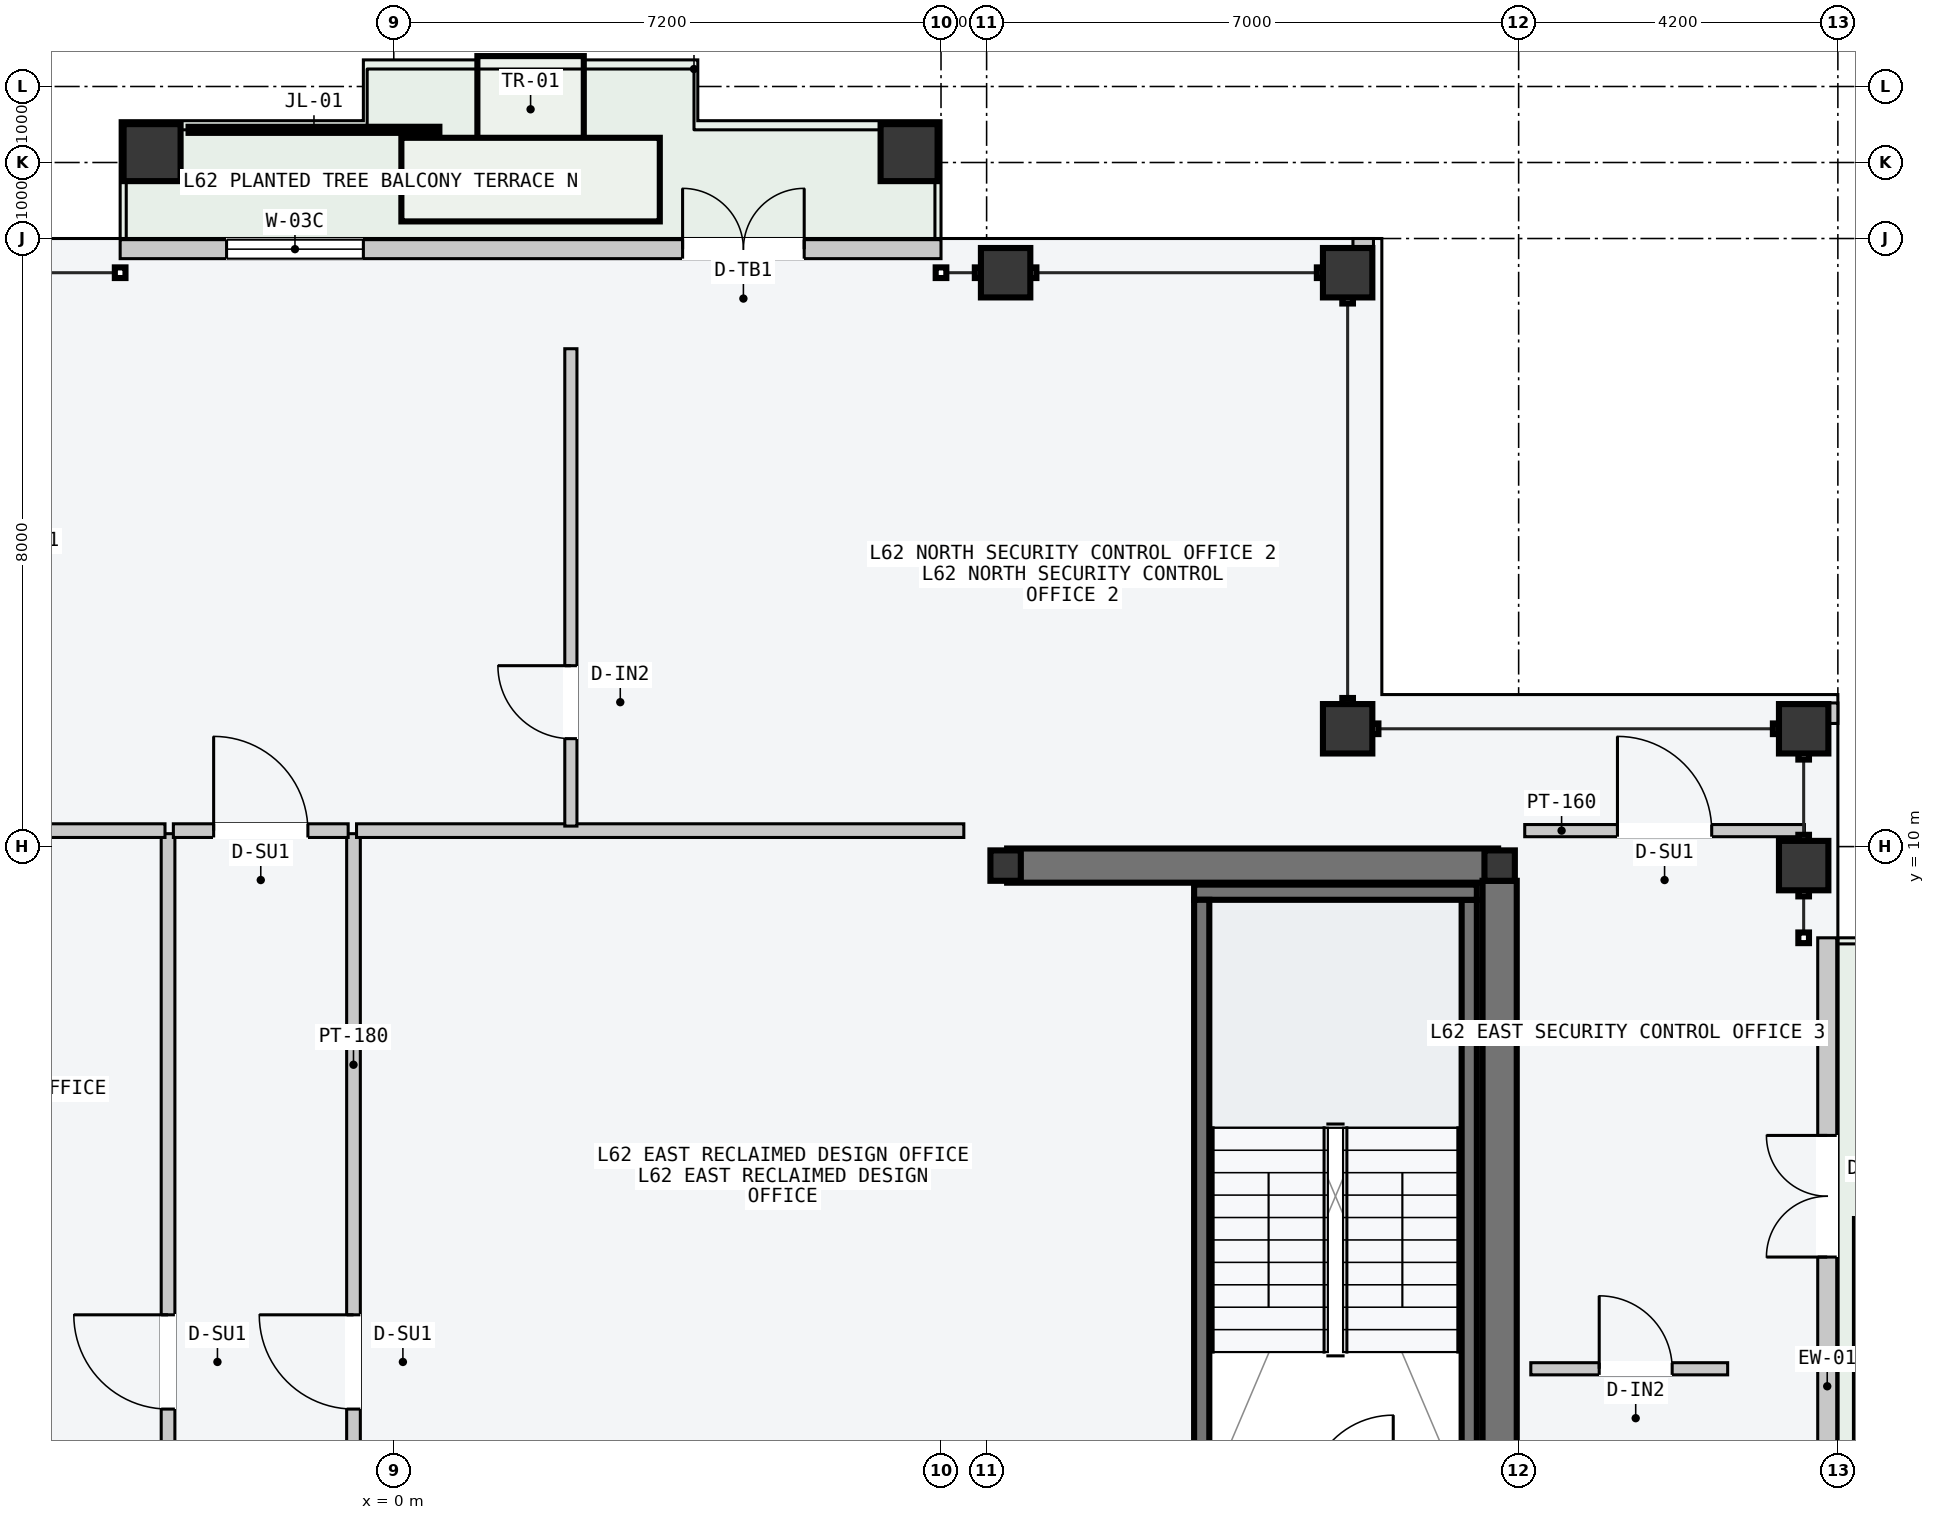
"""IFC4 building model, lengths in metres.
Left out: names, types, materials, properties, quantities, classifications, styles, units other than length and angle.
Written with IfcOpenShell. Run it as: python <this file> out.ifc"""

import sys

from ifc_helpers import new_model, si_unit, direction, frame, frame_2d, origin, origin_2d, place, context, subcontext, project, spatial, rectangle, hollow_rectangle, i_section, extrude, element, fill, save


model = new_model("IFC4")
c1 = context("Model", 3, precision=1e-05, world=origin(), true_north=direction((0.0, 1.0)))
c2 = subcontext(c1, "Body", "Model", "MODEL_VIEW")
j1 = project(units=[si_unit("LENGTHUNIT", "METRE"), si_unit("PLANEANGLEUNIT", "RADIAN")], contexts=[c1])
p1 = place(None, origin())
s1 = spatial("IfcSite", under=j1, at=p1, CompositionType="ELEMENT")
p2 = place(p1, origin())
s2 = spatial("IfcBuilding", under=s1, at=p2, CompositionType="ELEMENT")
p3 = place(p2, frame((0.0, 0.0, 236.4)))
s3 = spatial("IfcBuildingStorey", under=s2, at=p3, CompositionType="ELEMENT", Elevation=236.4)
p4 = place(p3, frame((8.07, 9.75, -0.2), z_axis=(0.0, 0.0, 1.0), x_axis=(1.0, 0.0, 0.0)))
e1 = element("IfcWall", 1, at=p4, inside=s3, PredefinedType="SHEAR", context=c2, shape_type="SweptSolid", body=[
    extrude(rectangle(XDim=6.46, YDim=0.45, at=frame_2d((3.23, 0.0))), origin(), (0.0, 0.0, 1.0), 3.6),
])
p5 = place(p3, frame((14.55, 0.2, -0.2), z_axis=(0.0, 0.0, 1.0), x_axis=(0.0, 1.0, 0.0)))
e2 = element("IfcWall", 2, at=p5, inside=s3, PredefinedType="SHEAR", context=c2, shape_type="SweptSolid", body=[
    extrude(rectangle(XDim=9.35, YDim=0.45, at=frame_2d((4.675, 0.0))), origin(), (0.0, 0.0, 1.0), 3.6),
])
p6 = place(p3, frame((14.15, 1.5, -0.2), z_axis=(0.0, 0.0, 1.0), x_axis=(0.0, 1.0, 0.0)))
e3 = element("IfcWall", 3, at=p6, inside=s3, PredefinedType="SOLIDWALL", context=c2, shape_type="SweptSolid", body=[
    extrude(rectangle(XDim=7.8, YDim=0.2, at=frame_2d((3.9, 0.0))), origin(), (0.0, 0.0, 1.0), 3.6),
])
p7 = place(p3, frame((10.53, 9.4, -0.2), z_axis=(0.0, 0.0, 1.0), x_axis=(1.0, 0.0, 0.0)))
e4 = element("IfcWall", 4, at=p7, inside=s3, PredefinedType="SOLIDWALL", context=c2, shape_type="SweptSolid", body=[
    extrude(rectangle(XDim=3.72, YDim=0.2, at=frame_2d((1.86, 0.0))), origin(), (0.0, 0.0, 1.0), 3.6),
])
p8 = place(p3, frame((10.63, 1.5, -0.2), z_axis=(0.0, 0.0, 1.0), x_axis=(0.0, 1.0, 0.0)))
e5 = element("IfcWall", 5, at=p8, inside=s3, PredefinedType="SOLIDWALL", context=c2, shape_type="SweptSolid", body=[
    extrude(rectangle(XDim=7.8, YDim=0.2, at=frame_2d((3.9, 0.0))), origin(), (0.0, 0.0, 1.0), 3.6),
])
for number, where, z_axis, x_axis in (
    (6, (8.05, 9.75, 0.0), (0.0, 0.0, 1.0), (1.0, 0.0, 0.0)),
    (7, (14.55, 9.75, 0.0), (0.0, 0.0, 1.0), (1.0, 0.0, 0.0)),
):
    element("IfcColumn", number, at=place(p3, frame(where, z_axis=z_axis, x_axis=x_axis)), inside=s3, PredefinedType="COLUMN", context=c2, shape_type="SweptSolid", body=[
        extrude(i_section(OverallWidth=0.4, OverallDepth=0.4, WebThickness=0.013, FlangeThickness=0.021, at=origin_2d()), origin(), (0.0, 0.0, 1.0), 3.6),
    ])
for number, where, z_axis, x_axis in (
    (8, (8.05, 17.55, 0.0), (0.0, 0.0, 1.0), (1.0, 0.0, 0.0)),
    (9, (12.55, 17.55, 0.0), (0.0, 0.0, 1.0), (1.0, 0.0, 0.0)),
    (10, (18.55, 9.75, 0.0), (0.0, 0.0, 1.0), (0.0, 1.0, 0.0)),
    (11, (18.55, 11.55, 0.0), (0.0, 0.0, 1.0), (0.0, 1.0, 0.0)),
    (12, (12.55, 11.55, 0.0), (0.0, 0.0, 1.0), (1.0, 0.0, 0.0)),
):
    element("IfcColumn", number, at=place(p3, frame(where, z_axis=z_axis, x_axis=x_axis)), inside=s3, PredefinedType="COLUMN", context=c2, shape_type="SweptSolid", body=[
        extrude(hollow_rectangle(XDim=0.65, YDim=0.65, WallThickness=0.028, at=origin_2d()), origin(), (0.0, 0.0, 1.0), 3.6),
    ])
for number, where, z_axis, x_axis in (
    (13, (-3.18, 19.13, 0.0), (0.0, 0.0, 1.0), (1.0, 0.0, 0.0)),
    (14, (6.78, 19.13, 0.0), (0.0, 0.0, 1.0), (1.0, 0.0, 0.0)),
):
    element("IfcColumn", number, at=place(p3, frame(where, z_axis=z_axis, x_axis=x_axis)), inside=s3, PredefinedType="COLUMN", context=c2, shape_type="SweptSolid", body=[
        extrude(hollow_rectangle(XDim=0.75, YDim=0.75, WallThickness=0.032, at=origin_2d()), origin(), (0.0, 0.0, 1.0), 3.6),
    ])
p9 = place(p3, frame((-3.6, 17.86, 0.0), z_axis=(0.0, 0.0, 1.0), x_axis=(1.0, 0.0, 0.0)))
e15 = element("IfcWall", 15, at=p9, inside=s3, PredefinedType="STANDARD", context=c2, shape_type="SweptSolid", body=[
    extrude(rectangle(XDim=10.8, YDim=0.25, at=frame_2d((5.4, 0.0))), origin(), (0.0, 0.0, 1.0), 3.4),
])
p10 = place(p9, frame((7.4, 0.0, 0.0)))
e16 = element("IfcOpeningElement", 16, at=p10, cuts=e15, PredefinedType="OPENING", context=c2, shape_type="SweptSolid", body=[
    extrude(rectangle(XDim=1.6, YDim=2.2, at=frame_2d((0.8, 1.1))), frame((0.0, 0.135, 0.0), z_axis=(0.0, -1.0, 0.0), x_axis=(1.0, 0.0, 0.0)), (0.0, 0.0, 1.0), 0.27),
])
p11 = place(p9, frame((1.4, 0.0, 0.85)))
e17 = element("IfcOpeningElement", 17, at=p11, cuts=e15, PredefinedType="OPENING", context=c2, shape_type="SweptSolid", body=[
    extrude(rectangle(XDim=1.8, YDim=2.05, at=frame_2d((0.9, 1.025))), frame((0.0, 0.135, 0.0), z_axis=(0.0, -1.0, 0.0), x_axis=(1.0, 0.0, 0.0)), (0.0, 0.0, 1.0), 0.27),
])
p12 = place(p3, frame((18.86, -2.0, 0.0), z_axis=(0.0, 0.0, 1.0), x_axis=(0.0, 1.0, 0.0)))
e18 = element("IfcWall", 18, at=p12, inside=s3, PredefinedType="STANDARD", context=c2, shape_type="SweptSolid", body=[
    extrude(rectangle(XDim=10.8, YDim=0.25, at=frame_2d((5.4, 0.0))), origin(), (0.0, 0.0, 1.0), 3.4),
])
p13 = place(p12, frame((6.6, 0.0, 0.0)))
e19 = element("IfcOpeningElement", 19, at=p13, cuts=e18, PredefinedType="OPENING", context=c2, shape_type="SweptSolid", body=[
    extrude(rectangle(XDim=1.6, YDim=2.2, at=frame_2d((0.8, 1.1))), frame((0.0, 0.135, 0.0), z_axis=(0.0, -1.0, 0.0), x_axis=(1.0, 0.0, 0.0)), (0.0, 0.0, 1.0), 0.27),
])
p14 = place(p12, frame((1.4, 0.0, 0.85)))
e20 = element("IfcOpeningElement", 20, at=p14, cuts=e18, PredefinedType="OPENING", context=c2, shape_type="SweptSolid", body=[
    extrude(rectangle(XDim=1.8, YDim=2.05, at=frame_2d((0.9, 1.025))), frame((0.0, 0.135, 0.0), z_axis=(0.0, -1.0, 0.0), x_axis=(1.0, 0.0, 0.0)), (0.0, 0.0, 1.0), 0.27),
])
for number, where, z_axis, x_axis in (
    (21, (12.62, 17.89, 0.0), (0.0, 0.0, 1.0), (1.0, 0.0, 0.0)),
    (22, (18.89, 11.62, 0.0), (0.0, 0.0, 1.0), (0.0, 1.0, 0.0)),
):
    element("IfcWall", number, at=place(p3, frame(where, z_axis=z_axis, x_axis=x_axis)), inside=s3, PredefinedType="PARAPET", context=c2, shape_type="SweptSolid", body=[
        extrude(rectangle(XDim=0.27, YDim=0.22, at=frame_2d((0.135, 0.0))), origin(), (0.0, 0.0, 1.0), 1.2),
    ])
p15 = place(p3, frame((-2.97, -3.5, 0.0), z_axis=(0.0, 0.0, 1.0), x_axis=(0.0, 1.0, 0.0)))
e23 = element("IfcWall", 23, at=p15, inside=s3, PredefinedType="PARTITIONING", context=c2, shape_type="SweptSolid", body=[
    extrude(rectangle(XDim=13.67, YDim=0.18, at=frame_2d((6.835, 0.0))), origin(), (0.0, 0.0, 1.0), 3.4),
])
p16 = place(p15, frame((6.1, 0.0, 0.0)))
e24 = element("IfcOpeningElement", 24, at=p16, cuts=e23, PredefinedType="OPENING", context=c2, shape_type="SweptSolid", body=[
    extrude(rectangle(XDim=1.24, YDim=2.24, at=frame_2d((0.62, 1.12))), frame((0.0, 0.1, 0.0), z_axis=(0.0, -1.0, 0.0), x_axis=(1.0, 0.0, 0.0)), (0.0, 0.0, 1.0), 0.2),
])
p17 = place(p15, frame((1.6, 0.0, 0.0)))
e25 = element("IfcOpeningElement", 25, at=p17, cuts=e23, PredefinedType="OPENING", context=c2, shape_type="SweptSolid", body=[
    extrude(rectangle(XDim=0.96, YDim=2.18, at=frame_2d((0.48, 1.09))), frame((0.0, 0.1, 0.0), z_axis=(0.0, -1.0, 0.0), x_axis=(1.0, 0.0, 0.0)), (0.0, 0.0, 1.0), 0.2),
])
p18 = place(p3, frame((-7.5, 10.21, 0.0), z_axis=(0.0, 0.0, 1.0), x_axis=(1.0, 0.0, 0.0)))
e26 = element("IfcWall", 26, at=p18, inside=s3, PredefinedType="PARTITIONING", context=c2, shape_type="SweptSolid", body=[
    extrude(rectangle(XDim=4.49, YDim=0.18, at=frame_2d((2.245, 0.0))), origin(), (0.0, 0.0, 1.0), 3.4),
])
p19 = place(p3, frame((-0.53, -3.5, 0.0), z_axis=(0.0, 0.0, 1.0), x_axis=(0.0, 1.0, 0.0)))
e27 = element("IfcWall", 27, at=p19, inside=s3, PredefinedType="PARTITIONING", context=c2, shape_type="SweptSolid", body=[
    extrude(rectangle(XDim=13.67, YDim=0.18, at=frame_2d((6.835, 0.0))), origin(), (0.0, 0.0, 1.0), 3.4),
])
p20 = place(p19, frame((6.1, 0.0, 0.0)))
e28 = element("IfcOpeningElement", 28, at=p20, cuts=e27, PredefinedType="OPENING", context=c2, shape_type="SweptSolid", body=[
    extrude(rectangle(XDim=1.24, YDim=2.24, at=frame_2d((0.62, 1.12))), frame((0.0, 0.1, 0.0), z_axis=(0.0, -1.0, 0.0), x_axis=(1.0, 0.0, 0.0)), (0.0, 0.0, 1.0), 0.2),
])
p21 = place(p19, frame((1.6, 0.0, 0.0)))
e29 = element("IfcOpeningElement", 29, at=p21, cuts=e27, PredefinedType="OPENING", context=c2, shape_type="SweptSolid", body=[
    extrude(rectangle(XDim=0.96, YDim=2.18, at=frame_2d((0.48, 1.09))), frame((0.0, 0.1, 0.0), z_axis=(0.0, -1.0, 0.0), x_axis=(1.0, 0.0, 0.0)), (0.0, 0.0, 1.0), 0.2),
])
p22 = place(p3, frame((-0.49, 10.21, 0.0), z_axis=(0.0, 0.0, 1.0), x_axis=(1.0, 0.0, 0.0)))
e30 = element("IfcWall", 30, at=p22, inside=s3, PredefinedType="PARTITIONING", context=c2, shape_type="SweptSolid", body=[
    extrude(rectangle(XDim=7.99, YDim=0.18, at=frame_2d((3.995, 0.0))), origin(), (0.0, 0.0, 1.0), 3.4),
])
p23 = place(p3, frame((2.33, 10.27, 0.0), z_axis=(0.0, 0.0, 1.0), x_axis=(0.0, 1.0, 0.0)))
e31 = element("IfcWall", 31, at=p23, inside=s3, PredefinedType="PARTITIONING", context=c2, shape_type="SweptSolid", body=[
    extrude(rectangle(XDim=6.28, YDim=0.16, at=frame_2d((3.14, 0.0))), origin(), (0.0, 0.0, 1.0), 3.4),
])
p24 = place(p23, frame((1.15, 0.0, 0.0)))
e32 = element("IfcOpeningElement", 32, at=p24, cuts=e31, PredefinedType="OPENING", context=c2, shape_type="SweptSolid", body=[
    extrude(rectangle(XDim=0.96, YDim=2.18, at=frame_2d((0.48, 1.09))), frame((0.0, 0.09, 0.0), z_axis=(0.0, -1.0, 0.0), x_axis=(1.0, 0.0, 0.0)), (0.0, 0.0, 1.0), 0.18),
])
p25 = place(p3, frame((-2.9, 10.21, 0.0), z_axis=(0.0, 0.0, 1.0), x_axis=(1.0, 0.0, 0.0)))
e33 = element("IfcWall", 33, at=p25, inside=s3, PredefinedType="PARTITIONING", context=c2, shape_type="SweptSolid", body=[
    extrude(rectangle(XDim=2.3, YDim=0.18, at=frame_2d((1.15, 0.0))), origin(), (0.0, 0.0, 1.0), 3.4),
])
p26 = place(p25, frame((0.53, 0.0, 0.0)))
e34 = element("IfcOpeningElement", 34, at=p26, cuts=e33, PredefinedType="OPENING", context=c2, shape_type="SweptSolid", body=[
    extrude(rectangle(XDim=1.24, YDim=2.24, at=frame_2d((0.62, 1.12))), frame((0.0, 0.1, 0.0), z_axis=(0.0, -1.0, 0.0), x_axis=(1.0, 0.0, 0.0)), (0.0, 0.0, 1.0), 0.2),
])
p27 = place(p3, frame((14.88, 10.21, 0.0), z_axis=(0.0, 0.0, 1.0), x_axis=(1.0, 0.0, 0.0)))
e35 = element("IfcWall", 35, at=p27, inside=s3, PredefinedType="PARTITIONING", context=c2, shape_type="SweptSolid", body=[
    extrude(rectangle(XDim=3.68, YDim=0.16, at=frame_2d((1.84, 0.0))), origin(), (0.0, 0.0, 1.0), 3.4),
])
p28 = place(p27, frame((1.22, 0.0, 0.0)))
e36 = element("IfcOpeningElement", 36, at=p28, cuts=e35, PredefinedType="OPENING", context=c2, shape_type="SweptSolid", body=[
    extrude(rectangle(XDim=1.24, YDim=2.24, at=frame_2d((0.62, 1.12))), frame((0.0, 0.09, 0.0), z_axis=(0.0, -1.0, 0.0), x_axis=(1.0, 0.0, 0.0)), (0.0, 0.0, 1.0), 0.18),
])
p29 = place(p3, frame((14.96, 3.13, 0.0), z_axis=(0.0, 0.0, 1.0), x_axis=(1.0, 0.0, 0.0)))
e37 = element("IfcWall", 37, at=p29, inside=s3, PredefinedType="PARTITIONING", context=c2, shape_type="SweptSolid", body=[
    extrude(rectangle(XDim=2.59, YDim=0.16, at=frame_2d((1.295, 0.0))), origin(), (0.0, 0.0, 1.0), 3.4),
])
p30 = place(p29, frame((0.9, 0.0, 0.0)))
e38 = element("IfcOpeningElement", 38, at=p30, cuts=e37, PredefinedType="OPENING", context=c2, shape_type="SweptSolid", body=[
    extrude(rectangle(XDim=0.96, YDim=2.18, at=frame_2d((0.48, 1.09))), frame((0.0, 0.09, 0.0), z_axis=(0.0, -1.0, 0.0), x_axis=(1.0, 0.0, 0.0)), (0.0, 0.0, 1.0), 0.18),
])
p31 = place(p10, origin())
e39 = element("IfcDoor", 39, at=p31, inside=s3, OperationType="DOUBLE_DOOR_SINGLE_SWING", PredefinedType="DOOR", context=c2, shape_type="SweptSolid", body=[
    extrude(rectangle(XDim=1.6, YDim=2.2, at=frame_2d((0.8, 1.1))), frame((0.0, 0.025, 0.0), z_axis=(0.0, -1.0, 0.0), x_axis=(1.0, 0.0, 0.0)), (0.0, 0.0, 1.0), 0.05),
])
fill(e16, e39)
p32 = place(p11, origin())
e40 = element("IfcWindow", 40, at=p32, inside=s3, PartitioningType="SINGLE_PANEL", PredefinedType="WINDOW", context=c2, shape_type="SweptSolid", body=[
    extrude(rectangle(XDim=1.8, YDim=2.05, at=frame_2d((0.9, 1.025))), frame((0.0, 0.03, 0.0), z_axis=(0.0, -1.0, 0.0), x_axis=(1.0, 0.0, 0.0)), (0.0, 0.0, 1.0), 0.06),
])
fill(e17, e40)
p33 = place(p13, origin())
e41 = element("IfcDoor", 41, at=p33, inside=s3, OperationType="DOUBLE_DOOR_SINGLE_SWING", PredefinedType="DOOR", context=c2, shape_type="SweptSolid", body=[
    extrude(rectangle(XDim=1.6, YDim=2.2, at=frame_2d((0.8, 1.1))), frame((0.0, 0.025, 0.0), z_axis=(0.0, -1.0, 0.0), x_axis=(1.0, 0.0, 0.0)), (0.0, 0.0, 1.0), 0.05),
])
fill(e19, e41)
p34 = place(p16, origin())
e42 = element("IfcDoor", 42, at=p34, inside=s3, OperationType="SINGLE_SWING_RIGHT", PredefinedType="DOOR", context=c2, shape_type="SweptSolid", body=[
    extrude(rectangle(XDim=1.24, YDim=2.24, at=frame_2d((0.62, 1.12))), frame((0.0, 0.025, 0.0), z_axis=(0.0, -1.0, 0.0), x_axis=(1.0, 0.0, 0.0)), (0.0, 0.0, 1.0), 0.05),
])
fill(e24, e42)
p35 = place(p20, origin())
e43 = element("IfcDoor", 43, at=p35, inside=s3, OperationType="SINGLE_SWING_RIGHT", PredefinedType="DOOR", context=c2, shape_type="SweptSolid", body=[
    extrude(rectangle(XDim=1.24, YDim=2.24, at=frame_2d((0.62, 1.12))), frame((0.0, 0.025, 0.0), z_axis=(0.0, -1.0, 0.0), x_axis=(1.0, 0.0, 0.0)), (0.0, 0.0, 1.0), 0.05),
])
fill(e28, e43)
p36 = place(p24, origin())
e44 = element("IfcDoor", 44, at=p36, inside=s3, OperationType="SINGLE_SWING_RIGHT", PredefinedType="DOOR", context=c2, shape_type="SweptSolid", body=[
    extrude(rectangle(XDim=0.96, YDim=2.18, at=frame_2d((0.48, 1.09))), frame((0.0, 0.025, 0.0), z_axis=(0.0, -1.0, 0.0), x_axis=(1.0, 0.0, 0.0)), (0.0, 0.0, 1.0), 0.05),
])
fill(e32, e44)
p37 = place(p26, origin())
e45 = element("IfcDoor", 45, at=p37, inside=s3, OperationType="SINGLE_SWING_LEFT", PredefinedType="DOOR", context=c2, shape_type="SweptSolid", body=[
    extrude(rectangle(XDim=1.24, YDim=2.24, at=frame_2d((0.62, 1.12))), frame((0.0, 0.025, 0.0), z_axis=(0.0, -1.0, 0.0), x_axis=(1.0, 0.0, 0.0)), (0.0, 0.0, 1.0), 0.05),
])
fill(e34, e45)
p38 = place(p28, origin())
e46 = element("IfcDoor", 46, at=p38, inside=s3, OperationType="SINGLE_SWING_LEFT", PredefinedType="DOOR", context=c2, shape_type="SweptSolid", body=[
    extrude(rectangle(XDim=1.24, YDim=2.24, at=frame_2d((0.62, 1.12))), frame((0.0, 0.025, 0.0), z_axis=(0.0, -1.0, 0.0), x_axis=(1.0, 0.0, 0.0)), (0.0, 0.0, 1.0), 0.05),
])
fill(e36, e46)
p39 = place(p30, origin())
e47 = element("IfcDoor", 47, at=p39, inside=s3, OperationType="SINGLE_SWING_LEFT", PredefinedType="DOOR", context=c2, shape_type="SweptSolid", body=[
    extrude(rectangle(XDim=0.96, YDim=2.18, at=frame_2d((0.48, 1.09))), frame((0.0, 0.025, 0.0), z_axis=(0.0, -1.0, 0.0), x_axis=(1.0, 0.0, 0.0)), (0.0, 0.0, 1.0), 0.05),
])
fill(e38, e47)
save(model, sys.argv[1])
